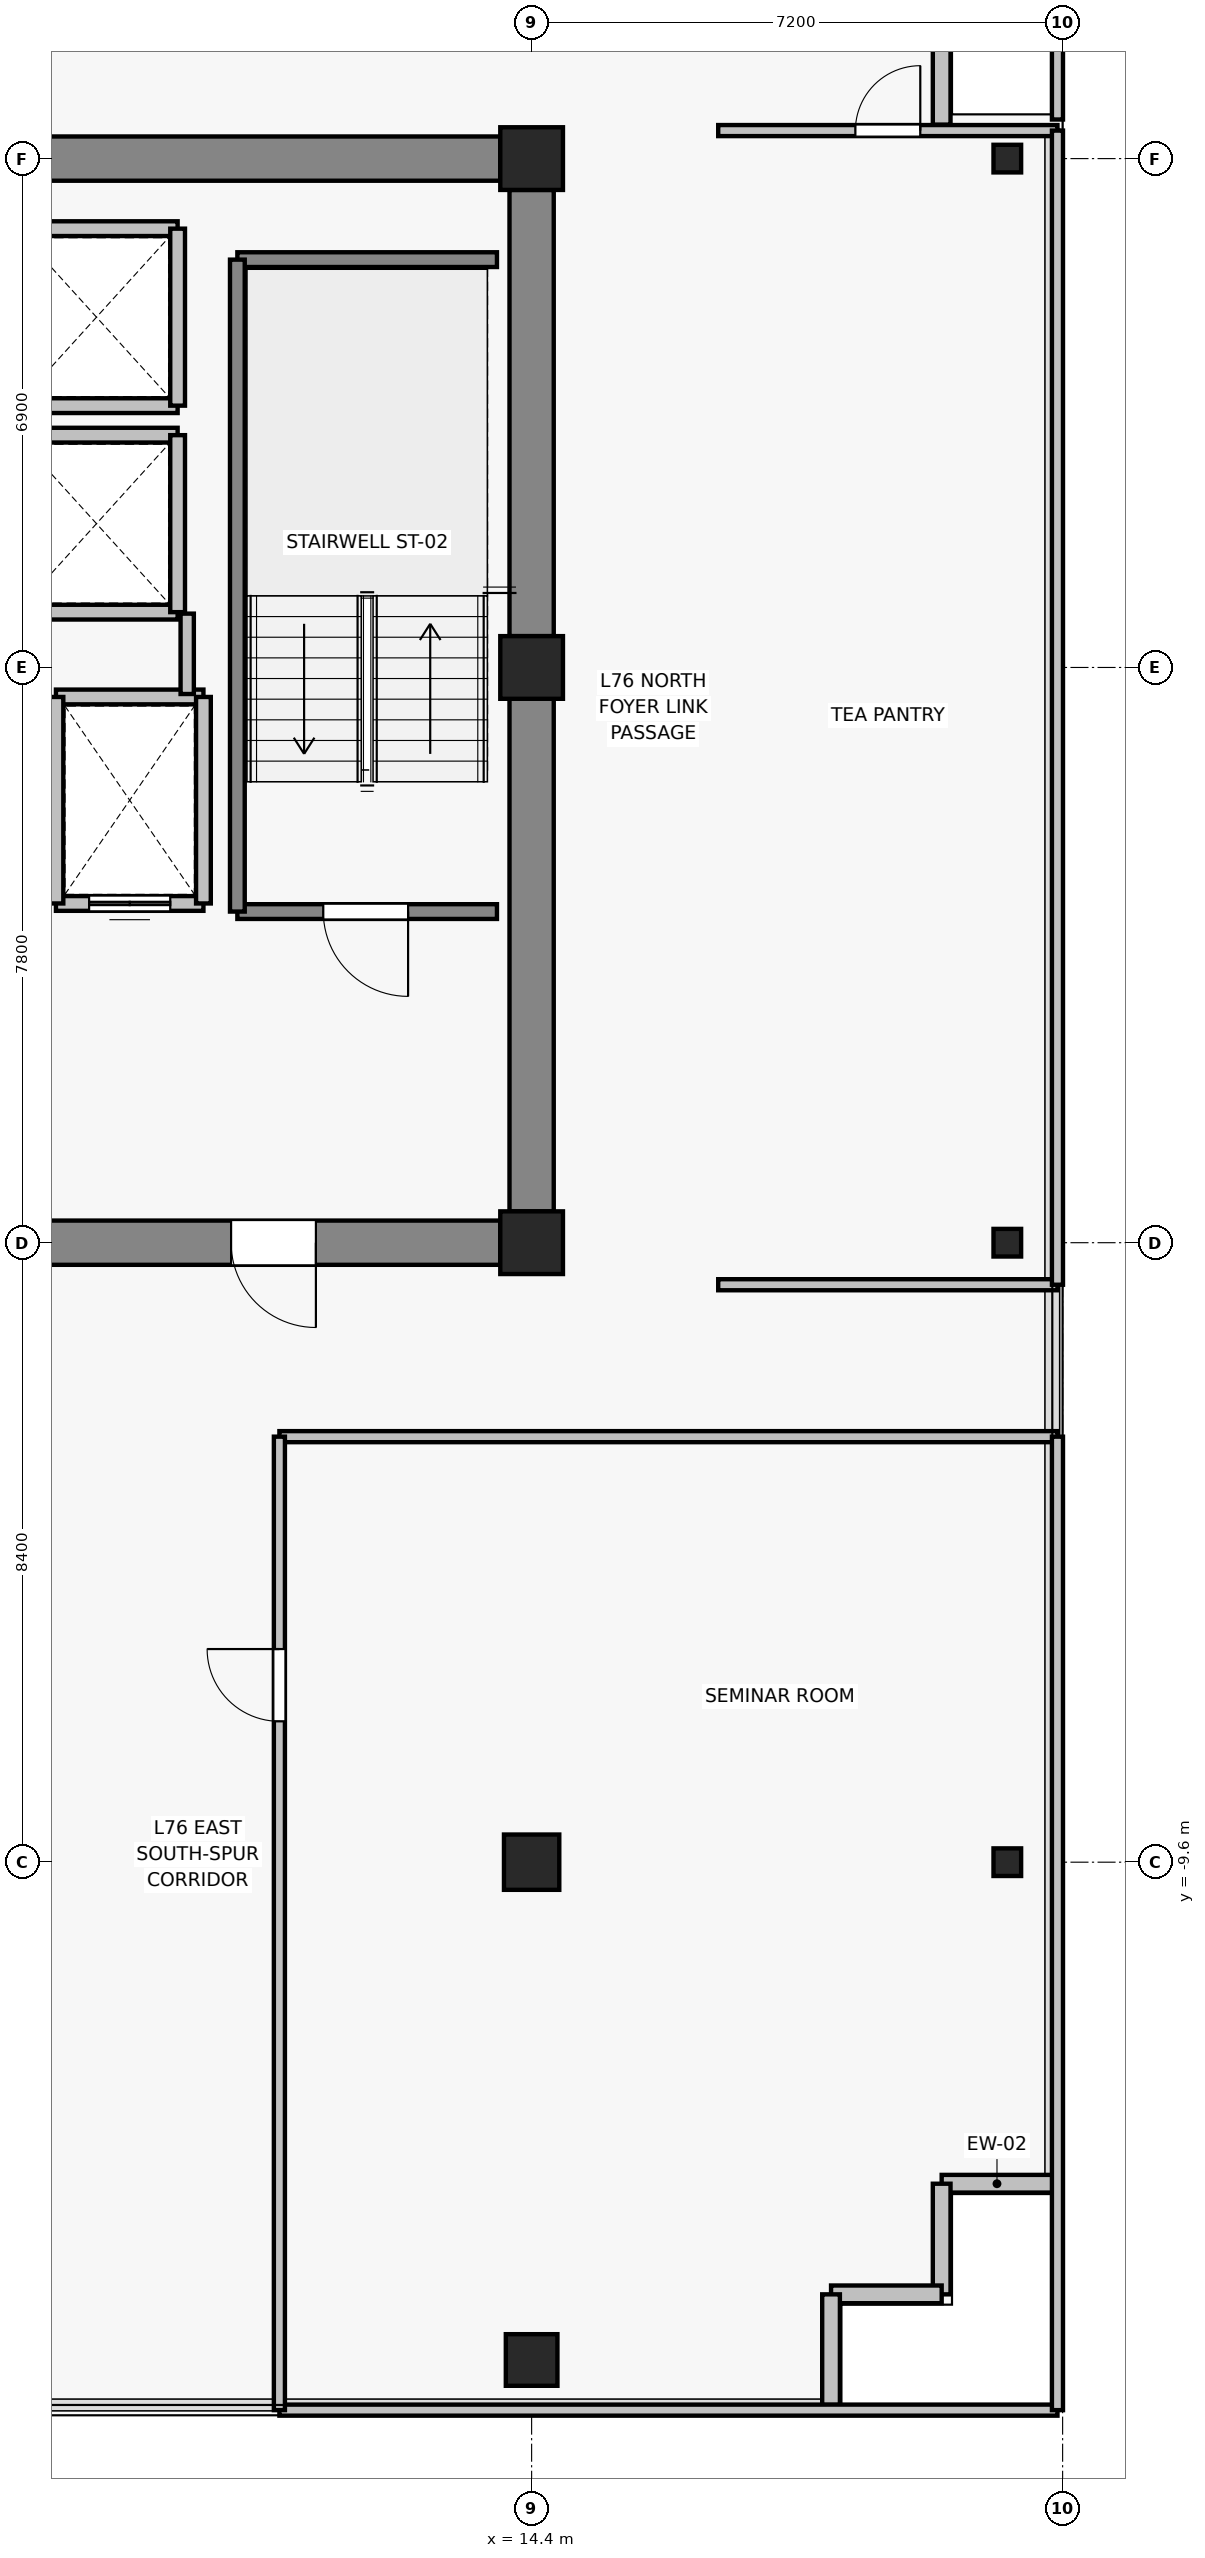
"""IFC4 building model, lengths in metres.
Left out: names, types, materials, properties, quantities, classifications, styles, units other than length and angle.
Written with IfcOpenShell. Run it as: python <this file> out.ifc"""

import sys

from ifc_helpers import new_model, si_unit, direction, frame, frame_2d, origin, origin_2d, place, context, subcontext, project, spatial, rectangle, i_section, extrude, source, transform, mapped, element, fill, save


model = new_model("IFC4")
c1 = context("Model", 3, precision=1e-05, world=origin(), true_north=direction((0.0, 1.0)))
c2 = subcontext(c1, "Body", "Model", "MODEL_VIEW")
j1 = project(units=[si_unit("LENGTHUNIT", "METRE"), si_unit("PLANEANGLEUNIT", "RADIAN")], contexts=[c1])
p1 = place(None, origin())
s1 = spatial("IfcSite", under=j1, at=p1, CompositionType="ELEMENT")
p2 = place(p1, origin())
s2 = spatial("IfcBuilding", under=s1, at=p2, CompositionType="ELEMENT")
p3 = place(p2, frame((0.0, 0.0, 268.3)))
s3 = spatial("IfcBuildingStorey", under=s2, at=p3, CompositionType="ELEMENT", Elevation=268.3)
for number, where, z_axis, x_axis in (
    (1, (14.4, -1.2, 0.0), (0.0, 0.0, 1.0), (1.0, 0.0, 0.0)),
    (2, (14.4, 6.6, 0.0), (0.0, 0.0, 1.0), (1.0, 0.0, 0.0)),
    (3, (14.4, 13.5, 0.0), (0.0, 0.0, 1.0), (1.0, 0.0, 0.0)),
):
    element("IfcColumn", number, at=place(p3, frame(where, z_axis=z_axis, x_axis=x_axis)), inside=s3, PredefinedType="COLUMN", context=c2, shape_type="SweptSolid", body=[
        extrude(rectangle(XDim=0.85, YDim=0.85, at=origin_2d()), origin(), (0.0, 0.0, 1.0), 3.3),
    ])
p4 = place(p3, frame((14.4, -9.6, 0.0), z_axis=(0.0, 0.0, 1.0), x_axis=(1.0, 0.0, 0.0)))
e4 = element("IfcColumn", 4, at=p4, inside=s3, PredefinedType="COLUMN", context=c2, shape_type="SweptSolid", body=[
    extrude(rectangle(XDim=0.75, YDim=0.75, at=origin_2d()), origin(), (0.0, 0.0, 1.0), 3.3),
])
p5 = place(p3, frame((14.4, -16.35, 0.0), z_axis=(0.0, 0.0, 1.0), x_axis=(1.0, 0.0, 0.0)))
e5 = element("IfcColumn", 5, at=p5, inside=s3, PredefinedType="COLUMN", context=c2, shape_type="SweptSolid", body=[
    extrude(rectangle(XDim=0.7, YDim=0.7, at=origin_2d()), origin(), (0.0, 0.0, 1.0), 3.3),
])
for number, where, z_axis, x_axis in (
    (6, (20.85, -9.6, 0.0), (0.0, 0.0, 1.0), (1.0, 0.0, 0.0)),
    (7, (20.85, -1.2, 0.0), (0.0, 0.0, 1.0), (1.0, 0.0, 0.0)),
    (8, (20.85, 13.5, 0.0), (0.0, 0.0, 1.0), (1.0, 0.0, 0.0)),
):
    element("IfcColumn", number, at=place(p3, frame(where, z_axis=z_axis, x_axis=x_axis)), inside=s3, PredefinedType="COLUMN", context=c2, shape_type="SweptSolid", body=[
        extrude(i_section(OverallWidth=0.375, OverallDepth=0.375, WebThickness=0.017, FlangeThickness=0.027, FilletRadius=0.015, at=origin_2d()), origin(), (0.0, 0.0, 1.0), 3.3),
    ])
p6 = place(p3, frame((7.625, 13.5, 0.0), z_axis=(0.0, 0.0, 1.0), x_axis=(1.0, 0.0, 0.0)))
e9 = element("IfcWall", 9, at=p6, inside=s3, PredefinedType="SHEAR", context=c2, shape_type="SweptSolid", body=[
    extrude(rectangle(XDim=6.35, YDim=0.6, at=frame_2d((3.175, 0.0))), origin(), (0.0, 0.0, 1.0), 3.08),
])
p7 = place(p3, frame((14.4, -0.775, 0.0), z_axis=(0.0, 0.0, 1.0), x_axis=(0.0, 1.0, 0.0)))
e10 = element("IfcWall", 10, at=p7, inside=s3, PredefinedType="SHEAR", context=c2, shape_type="SweptSolid", body=[
    extrude(rectangle(XDim=6.95, YDim=0.6, at=frame_2d((3.475, 0.0))), origin(), (0.0, 0.0, 1.0), 3.08),
])
p8 = place(p3, frame((14.4, 7.025, 0.0), z_axis=(0.0, 0.0, 1.0), x_axis=(0.0, 1.0, 0.0)))
e11 = element("IfcWall", 11, at=p8, inside=s3, PredefinedType="SHEAR", context=c2, shape_type="SweptSolid", body=[
    extrude(rectangle(XDim=6.05, YDim=0.6, at=frame_2d((3.025, 0.0))), origin(), (0.0, 0.0, 1.0), 3.08),
])
p9 = place(p3, frame((13.975, -1.2, 0.0), z_axis=(0.0, 0.0, 1.0), x_axis=(-1.0, 0.0, 0.0)))
e12 = element("IfcWall", 12, at=p9, inside=s3, PredefinedType="SHEAR", context=c2, shape_type="SweptSolid", body=[
    extrude(rectangle(XDim=6.35, YDim=0.6, at=frame_2d((3.175, 0.0))), origin(), (0.0, 0.0, 1.0), 3.08),
])
p10 = place(p9, frame((2.5, 0.0, 0.0)))
e13 = element("IfcOpeningElement", 13, at=p10, cuts=e12, PredefinedType="OPENING", context=c2, shape_type="SweptSolid", body=[
    extrude(rectangle(XDim=1.15, YDim=2.15, at=frame_2d((0.575, 1.075))), frame((0.0, 0.31, 0.0), z_axis=(0.0, -1.0, 0.0), x_axis=(1.0, 0.0, 0.0)), (0.0, 0.0, 1.0), 0.62),
])
for number, where, z_axis, x_axis in (
    (14, (19.96, 13.96, 0.0), (0.0, 0.0, 1.0), (0.0, 1.0, 0.0)),
    (15, (19.96, -13.96, 0.0), (0.0, 0.0, 1.0), (1.0, 0.0, 0.0)),
    (16, (19.96, -15.46, 0.0), (0.0, 0.0, 1.0), (0.0, 1.0, 0.0)),
    (17, (18.46, -15.46, 0.0), (0.0, 0.0, 1.0), (1.0, 0.0, 0.0)),
    (18, (18.46, -16.96, 0.0), (0.0, 0.0, 1.0), (0.0, 1.0, 0.0)),
):
    element("IfcWall", number, at=place(p3, frame(where, z_axis=z_axis, x_axis=x_axis)), inside=s3, PredefinedType="SOLIDWALL", context=c2, shape_type="SweptSolid", body=[
        extrude(rectangle(XDim=1.5, YDim=0.24, at=frame_2d((0.75, 0.0))), origin(), (0.0, 0.0, 1.0), 3.08),
    ])
p11 = place(p3, frame((9.95, 3.4, 0.0), z_axis=(0.0, 0.0, 1.0), x_axis=(-1.0, 0.0, 0.0)))
e19 = element("IfcWall", 19, at=p11, inside=s3, PredefinedType="SOLIDWALL", context=c2, shape_type="SweptSolid", body=[
    extrude(rectangle(XDim=2.0, YDim=0.2, at=frame_2d((1.0, 0.0))), origin(), (0.0, 0.0, 1.0), 3.08),
])
p12 = place(p11, frame((0.45, 0.0, 0.0)))
e20 = element("IfcOpeningElement", 20, at=p12, cuts=e19, PredefinedType="OPENING", context=c2, shape_type="SweptSolid", body=[
    extrude(rectangle(XDim=1.1, YDim=2.2, at=frame_2d((0.55, 1.1))), frame((0.0, 0.11, 0.0), z_axis=(0.0, -1.0, 0.0), x_axis=(1.0, 0.0, 0.0)), (0.0, 0.0, 1.0), 0.22),
])
p13 = place(p3, frame((7.95, 6.2, 0.0), z_axis=(0.0, 0.0, 1.0), x_axis=(1.0, 0.0, 0.0)))
e21 = element("IfcWall", 21, at=p13, inside=s3, PredefinedType="SOLIDWALL", context=c2, shape_type="SweptSolid", body=[
    extrude(rectangle(XDim=2.0, YDim=0.2, at=frame_2d((1.0, 0.0))), origin(), (0.0, 0.0, 1.0), 3.08),
])
for number, where, z_axis, x_axis in (
    (22, (7.95, 3.4, 0.0), (0.0, 0.0, 1.0), (0.0, 1.0, 0.0)),
    (23, (9.95, 6.2, 0.0), (0.0, 0.0, 1.0), (0.0, -1.0, 0.0)),
):
    element("IfcWall", number, at=place(p3, frame(where, z_axis=z_axis, x_axis=x_axis)), inside=s3, PredefinedType="SOLIDWALL", context=c2, shape_type="SweptSolid", body=[
        extrude(rectangle(XDim=2.8, YDim=0.2, at=frame_2d((1.4, 0.0))), origin(), (0.0, 0.0, 1.0), 3.08),
    ])
for number, where, z_axis, x_axis in (
    (24, (9.6, 7.35, 0.0), (0.0, 0.0, 1.0), (-1.0, 0.0, 0.0)),
    (25, (7.4, 9.75, 0.0), (0.0, 0.0, 1.0), (1.0, 0.0, 0.0)),
):
    element("IfcWall", number, at=place(p3, frame(where, z_axis=z_axis, x_axis=x_axis)), inside=s3, PredefinedType="SOLIDWALL", context=c2, shape_type="SweptSolid", body=[
        extrude(rectangle(XDim=2.2, YDim=0.2, at=frame_2d((1.1, 0.0))), origin(), (0.0, 0.0, 1.0), 2.47),
    ])
p14 = place(p3, frame((9.6, 9.75, 0.0), z_axis=(0.0, 0.0, 1.0), x_axis=(0.0, -1.0, 0.0)))
e26 = element("IfcWall", 26, at=p14, inside=s3, PredefinedType="SOLIDWALL", context=c2, shape_type="SweptSolid", body=[
    extrude(rectangle(XDim=2.4, YDim=0.2, at=frame_2d((1.2, 0.0))), origin(), (0.0, 0.0, 1.0), 3.08),
])
for number, where, z_axis, x_axis in (
    (27, (9.6, 10.15, 0.0), (0.0, 0.0, 1.0), (-1.0, 0.0, 0.0)),
    (28, (7.4, 12.55, 0.0), (0.0, 0.0, 1.0), (1.0, 0.0, 0.0)),
):
    element("IfcWall", number, at=place(p3, frame(where, z_axis=z_axis, x_axis=x_axis)), inside=s3, PredefinedType="SOLIDWALL", context=c2, shape_type="SweptSolid", body=[
        extrude(rectangle(XDim=2.2, YDim=0.2, at=frame_2d((1.1, 0.0))), origin(), (0.0, 0.0, 1.0), 2.47),
    ])
p15 = place(p3, frame((9.6, 12.55, 0.0), z_axis=(0.0, 0.0, 1.0), x_axis=(0.0, -1.0, 0.0)))
e29 = element("IfcWall", 29, at=p15, inside=s3, PredefinedType="SOLIDWALL", context=c2, shape_type="SweptSolid", body=[
    extrude(rectangle(XDim=2.4, YDim=0.2, at=frame_2d((1.2, 0.0))), origin(), (0.0, 0.0, 1.0), 3.08),
])
p16 = place(p3, frame((13.93, 3.29, 0.0), z_axis=(0.0, 0.0, 1.0), x_axis=(-1.0, 0.0, 0.0)))
e30 = element("IfcWall", 30, at=p16, inside=s3, PredefinedType="SOLIDWALL", context=c2, shape_type="SweptSolid", body=[
    extrude(rectangle(XDim=3.52, YDim=0.2, at=frame_2d((1.76, 0.0))), origin(), (0.0, 0.0, 1.0), 3.08),
])
p17 = place(p16, frame((1.205, 0.0, 0.0)))
e31 = element("IfcOpeningElement", 31, at=p17, cuts=e30, PredefinedType="OPENING", context=c2, shape_type="SweptSolid", body=[
    extrude(rectangle(XDim=1.15, YDim=2.15, at=frame_2d((0.575, 1.075))), frame((0.0, 0.11, 0.0), z_axis=(0.0, -1.0, 0.0), x_axis=(1.0, 0.0, 0.0)), (0.0, 0.0, 1.0), 0.22),
])
p18 = place(p3, frame((10.41, 12.13, 0.0), z_axis=(0.0, 0.0, 1.0), x_axis=(1.0, 0.0, 0.0)))
e32 = element("IfcWall", 32, at=p18, inside=s3, PredefinedType="SOLIDWALL", context=c2, shape_type="SweptSolid", body=[
    extrude(rectangle(XDim=3.52, YDim=0.2, at=frame_2d((1.76, 0.0))), origin(), (0.0, 0.0, 1.0), 3.08),
])
p19 = place(p3, frame((10.41, 3.29, 0.0), z_axis=(0.0, 0.0, 1.0), x_axis=(0.0, 1.0, 0.0)))
e33 = element("IfcWall", 33, at=p19, inside=s3, PredefinedType="SOLIDWALL", context=c2, shape_type="SweptSolid", body=[
    extrude(rectangle(XDim=8.84, YDim=0.2, at=frame_2d((4.42, 0.0))), origin(), (0.0, 0.0, 1.0), 3.08),
])
p20 = place(p3, frame((9.73, 7.33, 0.0), z_axis=(0.0, 0.0, 1.0), x_axis=(0.0, -1.0, 0.0)))
e34 = element("IfcWall", 34, at=p20, inside=s3, PredefinedType="PARTITIONING", context=c2, shape_type="SweptSolid", body=[
    extrude(rectangle(XDim=1.09, YDim=0.18, at=frame_2d((0.545, 0.0))), origin(), (0.0, 0.0, 1.0), 3.08),
])
p21 = place(p3, frame((21.53, -17.03, 0.0), z_axis=(0.0, 0.0, 1.0), x_axis=(-1.0, 0.0, 0.0)))
e35 = element("IfcWall", 35, at=p21, inside=s3, PredefinedType="PARTITIONING", context=c2, shape_type="SweptSolid", body=[
    extrude(rectangle(XDim=10.55, YDim=0.15, at=frame_2d((5.275, 0.0))), origin(), (0.0, 0.0, 1.0), 3.08),
])
p22 = place(p3, frame((10.98, -3.83, 0.0), z_axis=(0.0, 0.0, 1.0), x_axis=(1.0, 0.0, 0.0)))
e36 = element("IfcWall", 36, at=p22, inside=s3, PredefinedType="PARTITIONING", context=c2, shape_type="SweptSolid", body=[
    extrude(rectangle(XDim=10.55, YDim=0.15, at=frame_2d((5.275, 0.0))), origin(), (0.0, 0.0, 1.0), 2.47),
])
p23 = place(p3, frame((10.98, -17.03, 0.0), z_axis=(0.0, 0.0, 1.0), x_axis=(0.0, 1.0, 0.0)))
e37 = element("IfcWall", 37, at=p23, inside=s3, PredefinedType="PARTITIONING", context=c2, shape_type="SweptSolid", body=[
    extrude(rectangle(XDim=13.2, YDim=0.15, at=frame_2d((6.6, 0.0))), origin(), (0.0, 0.0, 1.0), 2.47),
])
p24 = place(p23, frame((9.34, 0.0, 0.0)))
e38 = element("IfcOpeningElement", 38, at=p24, cuts=e37, PredefinedType="OPENING", context=c2, shape_type="SweptSolid", body=[
    extrude(rectangle(XDim=0.98, YDim=2.15, at=frame_2d((0.49, 1.075))), frame((0.0, 0.085, 0.0), z_axis=(0.0, -1.0, 0.0), x_axis=(1.0, 0.0, 0.0)), (0.0, 0.0, 1.0), 0.17),
])
p25 = place(p3, frame((21.53, -3.83, 0.0), z_axis=(0.0, 0.0, 1.0), x_axis=(0.0, -1.0, 0.0)))
e39 = element("IfcWall", 39, at=p25, inside=s3, PredefinedType="PARTITIONING", context=c2, shape_type="SweptSolid", body=[
    extrude(rectangle(XDim=13.2, YDim=0.15, at=frame_2d((6.6, 0.0))), origin(), (0.0, 0.0, 1.0), 3.08),
])
p26 = place(p3, frame((21.53, -1.77, 0.0), z_axis=(0.0, 0.0, 1.0), x_axis=(-1.0, 0.0, 0.0)))
e40 = element("IfcWall", 40, at=p26, inside=s3, PredefinedType="PARTITIONING", context=c2, shape_type="SweptSolid", body=[
    extrude(rectangle(XDim=4.6, YDim=0.15, at=frame_2d((2.3, 0.0))), origin(), (0.0, 0.0, 1.0), 2.79),
])
p27 = place(p3, frame((16.93, 13.88, 0.0), z_axis=(0.0, 0.0, 1.0), x_axis=(1.0, 0.0, 0.0)))
e41 = element("IfcWall", 41, at=p27, inside=s3, PredefinedType="PARTITIONING", context=c2, shape_type="SweptSolid", body=[
    extrude(rectangle(XDim=4.6, YDim=0.15, at=frame_2d((2.3, 0.0))), origin(), (0.0, 0.0, 1.0), 3.08),
])
p28 = place(p27, frame((1.86, 0.0, 0.0)))
e42 = element("IfcOpeningElement", 42, at=p28, cuts=e41, PredefinedType="OPENING", context=c2, shape_type="SweptSolid", body=[
    extrude(rectangle(XDim=0.88, YDim=2.1, at=frame_2d((0.44, 1.05))), frame((0.0, 0.085, 0.0), z_axis=(0.0, -1.0, 0.0), x_axis=(1.0, 0.0, 0.0)), (0.0, 0.0, 1.0), 0.17),
])
p29 = place(p3, frame((21.53, 13.88, 0.0), z_axis=(0.0, 0.0, 1.0), x_axis=(0.0, -1.0, 0.0)))
e43 = element("IfcWall", 43, at=p29, inside=s3, PredefinedType="PARTITIONING", context=c2, shape_type="SweptSolid", body=[
    extrude(rectangle(XDim=15.65, YDim=0.15, at=frame_2d((7.825, 0.0))), origin(), (0.0, 0.0, 1.0), 3.08),
])
p30 = place(p3, frame((21.53, 17.03, 0.0), z_axis=(0.0, 0.0, 1.0), x_axis=(0.0, -1.0, 0.0)))
e44 = element("IfcWall", 44, at=p30, inside=s3, PredefinedType="PARTITIONING", context=c2, shape_type="SweptSolid", body=[
    extrude(rectangle(XDim=3.0, YDim=0.15, at=frame_2d((1.5, 0.0))), origin(), (0.0, 0.0, 1.0), 3.08),
])
m1 = source(origin(), c2, "Body", "SweptSolid", [
    extrude(rectangle(XDim=1.1, YDim=2.2, at=frame_2d((0.55, 1.1))), frame((0.0, 0.025, 0.0), z_axis=(0.0, -1.0, 0.0), x_axis=(1.0, 0.0, 0.0)), (0.0, 0.0, 1.0), 0.05),
])
p31 = place(p12, origin())
e45 = element("IfcDoor", 45, at=p31, inside=s3, OperationType="DOUBLE_DOOR_SLIDING", PredefinedType="DOOR", context=c2, shape_type="MappedRepresentation", body=[
    mapped(m1, transform((0.0, 0.0, 0.0), x_axis=(1.0, 0.0, 0.0), y_axis=(0.0, 1.0, 0.0), z_axis=(0.0, 0.0, 1.0), scale=1.0)),
])
fill(e20, e45)
m2 = source(origin(), c2, "Body", "SweptSolid", [
    extrude(rectangle(XDim=1.15, YDim=2.15, at=frame_2d((0.575, 1.075))), frame((0.0, 0.025, 0.0), z_axis=(0.0, -1.0, 0.0), x_axis=(1.0, 0.0, 0.0)), (0.0, 0.0, 1.0), 0.05),
])
p32 = place(p17, origin())
e46 = element("IfcDoor", 46, at=p32, inside=s3, OperationType="SINGLE_SWING_LEFT", PredefinedType="DOOR", context=c2, shape_type="MappedRepresentation", body=[
    mapped(m2, transform((0.0, 0.0, 0.0), x_axis=(1.0, 0.0, 0.0), y_axis=(0.0, 1.0, 0.0), z_axis=(0.0, 0.0, 1.0), scale=1.0)),
])
fill(e31, e46)
p33 = place(p10, origin())
e47 = element("IfcDoor", 47, at=p33, inside=s3, OperationType="SINGLE_SWING_LEFT", PredefinedType="DOOR", context=c2, shape_type="MappedRepresentation", body=[
    mapped(m2, transform((0.0, 0.0, 0.0), x_axis=(1.0, 0.0, 0.0), y_axis=(0.0, 1.0, 0.0), z_axis=(0.0, 0.0, 1.0), scale=1.0)),
])
fill(e13, e47)
m3 = source(origin(), c2, "Body", "SweptSolid", [
    extrude(rectangle(XDim=0.98, YDim=2.15, at=frame_2d((0.49, 1.075))), frame((0.0, 0.025, 0.0), z_axis=(0.0, -1.0, 0.0), x_axis=(1.0, 0.0, 0.0)), (0.0, 0.0, 1.0), 0.05),
])
p34 = place(p24, origin())
e48 = element("IfcDoor", 48, at=p34, inside=s3, OperationType="SINGLE_SWING_RIGHT", PredefinedType="DOOR", context=c2, shape_type="MappedRepresentation", body=[
    mapped(m3, transform((0.0, 0.0, 0.0), x_axis=(1.0, 0.0, 0.0), y_axis=(0.0, 1.0, 0.0), z_axis=(0.0, 0.0, 1.0), scale=1.0)),
])
fill(e38, e48)
m4 = source(origin(), c2, "Body", "SweptSolid", [
    extrude(rectangle(XDim=0.88, YDim=2.1, at=frame_2d((0.44, 1.05))), frame((0.0, 0.025, 0.0), z_axis=(0.0, -1.0, 0.0), x_axis=(1.0, 0.0, 0.0)), (0.0, 0.0, 1.0), 0.05),
])
p35 = place(p28, origin())
e49 = element("IfcDoor", 49, at=p35, inside=s3, OperationType="SINGLE_SWING_RIGHT", PredefinedType="DOOR", context=c2, shape_type="MappedRepresentation", body=[
    mapped(m4, transform((0.0, 0.0, 0.0), x_axis=(1.0, 0.0, 0.0), y_axis=(0.0, 1.0, 0.0), z_axis=(0.0, 0.0, 1.0), scale=1.0)),
])
fill(e42, e49)
save(model, sys.argv[1])
